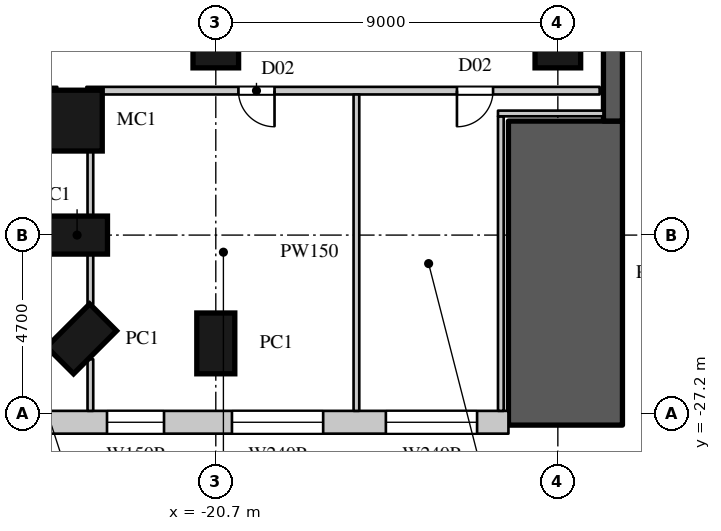
"""IFC4 building model, lengths in metres.
Left out: names, types, materials, properties, quantities, classifications, styles, units other than length and angle.
Written with IfcOpenShell. Run it as: python <this file> out.ifc"""

import sys

from ifc_helpers import new_model, si_unit, direction, frame, frame_2d, origin, origin_2d, place, context, subcontext, project, spatial, rectangle, circle, extrude, element, fill, save


model = new_model("IFC4")
c1 = context("Model", 3, precision=1e-05, world=origin(), true_north=direction((0.0, 1.0)))
c2 = subcontext(c1, "Body", "Model", "MODEL_VIEW")
j1 = project(units=[si_unit("LENGTHUNIT", "METRE"), si_unit("PLANEANGLEUNIT", "RADIAN")], contexts=[c1])
p1 = place(None, origin())
s1 = spatial("IfcSite", under=j1, at=p1, CompositionType="ELEMENT")
p2 = place(p1, origin())
s2 = spatial("IfcBuilding", under=s1, at=p2, CompositionType="ELEMENT")
p3 = place(p2, frame((0.0, 0.0, 19.0)))
s3 = spatial("IfcBuildingStorey", under=s2, at=p3, CompositionType="ELEMENT", Elevation=19.0)
p4 = place(p3, frame((-11.5, -27.5, 0.0), z_axis=(0.0, 0.0, 1.0), x_axis=(0.0, 1.0, 0.0)))
e1 = element("IfcWall", 1, at=p4, inside=s3, PredefinedType="SOLIDWALL", context=c2, shape_type="SweptSolid", body=[
    extrude(rectangle(XDim=8.0, YDim=3.0, at=frame_2d((4.0, 0.0))), origin(), (0.0, 0.0, 1.0), 10.0),
])
p5 = place(p3, frame((-10.25, -19.5, 0.0), z_axis=(0.0, 0.0, 1.0), x_axis=(0.0, 1.0, 0.0)))
e2 = element("IfcWall", 2, at=p5, inside=s3, PredefinedType="SOLIDWALL", context=c2, shape_type="SweptSolid", body=[
    extrude(rectangle(XDim=39.0, YDim=0.5, at=frame_2d((19.5, 0.0))), origin(), (0.0, 0.0, 1.0), 10.0),
])
p6 = place(p3, frame((-24.488, -19.488, 0.0), z_axis=(0.0, 0.0, 1.0), x_axis=(1.0, 0.0, 0.0)))
e3 = element("IfcColumn", 3, at=p6, inside=s3, PredefinedType="COLUMN", context=c2, shape_type="SweptSolid", body=[
    extrude(circle(Radius=0.8, at=origin_2d()), origin(), (0.0, 0.0, 1.0), 10.0),
])
for number, where, z_axis, x_axis in (
    (4, (-24.35, -22.5, 0.0), (0.0, 0.0, 1.0), (0.0, -1.0, 0.0)),
    (5, (-24.231, -25.231, 0.0), (0.0, 0.0, 1.0), (0.707, -0.707, 0.0)),
    (6, (-20.7, -25.35, 0.0), (0.0, 0.0, 1.0), (1.0, 0.0, 0.0)),
):
    element("IfcColumn", number, at=place(p3, frame(where, z_axis=z_axis, x_axis=x_axis)), inside=s3, PredefinedType="COLUMN", context=c2, shape_type="SweptSolid", body=[
        extrude(rectangle(XDim=1.0, YDim=1.6, at=origin_2d()), origin(), (0.0, 0.0, 1.0), 10.0),
    ])
for number, where, z_axis, x_axis in (
    (7, (-20.7, -17.5, 0.0), (0.0, 0.0, 1.0), (1.0, 0.0, 0.0)),
    (8, (-11.7, -17.5, 0.0), (0.0, 0.0, 1.0), (1.0, 0.0, 0.0)),
):
    element("IfcColumn", number, at=place(p3, frame(where, z_axis=z_axis, x_axis=x_axis)), inside=s3, PredefinedType="COLUMN", context=c2, shape_type="SweptSolid", body=[
        extrude(circle(Radius=0.6, at=origin_2d()), origin(), (0.0, 0.0, 1.0), 10.0),
    ])
p7 = place(p3, frame((-29.2, -27.425, 0.0), z_axis=(0.0, 0.0, 1.0), x_axis=(1.0, 0.0, 0.0)))
e9 = element("IfcWall", 9, at=p7, inside=s3, PredefinedType="ELEMENTEDWALL", context=c2, shape_type="SweptSolid", body=[
    extrude(rectangle(XDim=16.2, YDim=0.6, at=frame_2d((8.1, 0.0))), origin(), (0.0, 0.0, 1.0), 9.6),
])
p8 = place(p7, frame((0.825, 0.0, 3.0)))
e10 = element("IfcOpeningElement", 10, at=p8, cuts=e9, PredefinedType="OPENING", context=c2, shape_type="SweptSolid", body=[
    extrude(rectangle(XDim=2.4, YDim=2.4, at=frame_2d((1.2, 1.2))), frame((0.0, 0.31, 0.0), z_axis=(0.0, -1.0, 0.0), x_axis=(1.0, 0.0, 0.0)), (0.0, 0.0, 1.0), 0.62),
])
p9 = place(p7, frame((8.925, 0.0, 3.0)))
e11 = element("IfcOpeningElement", 11, at=p9, cuts=e9, PredefinedType="OPENING", context=c2, shape_type="SweptSolid", body=[
    extrude(rectangle(XDim=2.4, YDim=2.4, at=frame_2d((1.2, 1.2))), frame((0.0, 0.31, 0.0), z_axis=(0.0, -1.0, 0.0), x_axis=(1.0, 0.0, 0.0)), (0.0, 0.0, 1.0), 0.62),
])
p10 = place(p7, frame((12.975, 0.0, 3.0)))
e12 = element("IfcOpeningElement", 12, at=p10, cuts=e9, PredefinedType="OPENING", context=c2, shape_type="SweptSolid", body=[
    extrude(rectangle(XDim=2.4, YDim=2.4, at=frame_2d((1.2, 1.2))), frame((0.0, 0.31, 0.0), z_axis=(0.0, -1.0, 0.0), x_axis=(1.0, 0.0, 0.0)), (0.0, 0.0, 1.0), 0.62),
])
p11 = place(p7, frame((5.637, 0.0, 3.0)))
e13 = element("IfcOpeningElement", 13, at=p11, cuts=e9, PredefinedType="OPENING", context=c2, shape_type="SweptSolid", body=[
    extrude(rectangle(XDim=1.5, YDim=2.4, at=frame_2d((0.75, 1.2))), frame((0.0, 0.31, 0.0), z_axis=(0.0, -1.0, 0.0), x_axis=(1.0, 0.0, 0.0)), (0.0, 0.0, 1.0), 0.62),
])
p12 = place(p3, frame((-28.55, -18.7, 0.0), z_axis=(0.0, 0.0, 1.0), x_axis=(1.0, 0.0, 0.0)))
e14 = element("IfcWall", 14, at=p12, inside=s3, PredefinedType="PARTITIONING", context=c2, shape_type="SweptSolid", body=[
    extrude(rectangle(XDim=3.679, YDim=0.2, at=frame_2d((1.839, 0.0))), origin(), (0.0, 0.0, 1.0), 9.598),
])
p13 = place(p12, frame((1.35, 0.0, 0.0)))
e15 = element("IfcOpeningElement", 15, at=p13, cuts=e14, PredefinedType="OPENING", context=c2, shape_type="SweptSolid", body=[
    extrude(rectangle(XDim=0.95, YDim=2.2, at=frame_2d((0.475, 1.1))), frame((0.0, 0.11, 0.0), z_axis=(0.0, -1.0, 0.0), x_axis=(1.0, 0.0, 0.0)), (0.0, 0.0, 1.0), 0.22),
])
p14 = place(p3, frame((-24.105, -18.7, 0.0), z_axis=(0.0, 0.0, 1.0), x_axis=(1.0, 0.0, 0.0)))
e16 = element("IfcWall", 16, at=p14, inside=s3, PredefinedType="PARTITIONING", context=c2, shape_type="SweptSolid", body=[
    extrude(rectangle(XDim=13.505, YDim=0.2, at=frame_2d((6.752, 0.0))), origin(), (0.0, 0.0, 1.0), 9.598),
])
p15 = place(p14, frame((4.0, 0.0, 0.0)))
e17 = element("IfcOpeningElement", 17, at=p15, cuts=e16, PredefinedType="OPENING", context=c2, shape_type="SweptSolid", body=[
    extrude(rectangle(XDim=0.95, YDim=2.2, at=frame_2d((0.475, 1.1))), frame((0.0, 0.11, 0.0), z_axis=(0.0, -1.0, 0.0), x_axis=(1.0, 0.0, 0.0)), (0.0, 0.0, 1.0), 0.22),
])
p16 = place(p14, frame((9.75, 0.0, 0.0)))
e18 = element("IfcOpeningElement", 18, at=p16, cuts=e16, PredefinedType="OPENING", context=c2, shape_type="SweptSolid", body=[
    extrude(rectangle(XDim=0.95, YDim=2.2, at=frame_2d((0.475, 1.1))), frame((0.0, 0.11, 0.0), z_axis=(0.0, -1.0, 0.0), x_axis=(1.0, 0.0, 0.0)), (0.0, 0.0, 1.0), 0.22),
])
p17 = place(p3, frame((-24.0, -27.125, 0.0), z_axis=(0.0, 0.0, 1.0), x_axis=(0.0, 1.0, 0.0)))
e19 = element("IfcWall", 19, at=p17, inside=s3, PredefinedType="PARTITIONING", context=c2, shape_type="SweptSolid", body=[
    extrude(rectangle(XDim=1.358, YDim=0.15, at=frame_2d((0.679, 0.0))), origin(), (0.0, 0.0, 1.0), 9.598),
])
p18 = place(p3, frame((-24.0, -24.32, 0.0), z_axis=(0.0, 0.0, 1.0), x_axis=(0.0, 1.0, 0.0)))
e20 = element("IfcWall", 20, at=p18, inside=s3, PredefinedType="PARTITIONING", context=c2, shape_type="SweptSolid", body=[
    extrude(rectangle(XDim=1.32, YDim=0.15, at=frame_2d((0.66, 0.0))), origin(), (0.0, 0.0, 1.0), 9.598),
])
p19 = place(p3, frame((-24.0, -22.0, 0.0), z_axis=(0.0, 0.0, 1.0), x_axis=(0.0, 1.0, 0.0)))
e21 = element("IfcWall", 21, at=p19, inside=s3, PredefinedType="PARTITIONING", context=c2, shape_type="SweptSolid", body=[
    extrude(rectangle(XDim=1.843, YDim=0.15, at=frame_2d((0.921, 0.0))), origin(), (0.0, 0.0, 1.0), 9.598),
])
p20 = place(p3, frame((-17.0, -27.125, 0.0), z_axis=(0.0, 0.0, 1.0), x_axis=(0.0, 1.0, 0.0)))
e22 = element("IfcWall", 22, at=p20, inside=s3, PredefinedType="PARTITIONING", context=c2, shape_type="SweptSolid", body=[
    extrude(rectangle(XDim=8.325, YDim=0.15, at=frame_2d((4.163, 0.0))), origin(), (0.0, 0.0, 1.0), 9.598),
])
p21 = place(p3, frame((-13.2, -27.125, 0.0), z_axis=(0.0, 0.0, 1.0), x_axis=(0.0, 1.0, 0.0)))
e23 = element("IfcWall", 23, at=p21, inside=s3, PredefinedType="PARTITIONING", context=c2, shape_type="SweptSolid", body=[
    extrude(rectangle(XDim=7.75, YDim=0.15, at=frame_2d((3.875, 0.0))), origin(), (0.0, 0.0, 1.0), 9.598),
])
p22 = place(p3, frame((-13.275, -19.3, 0.0), z_axis=(0.0, 0.0, 1.0), x_axis=(1.0, 0.0, 0.0)))
e24 = element("IfcWall", 24, at=p22, inside=s3, PredefinedType="PARTITIONING", context=c2, shape_type="SweptSolid", body=[
    extrude(rectangle(XDim=2.775, YDim=0.15, at=frame_2d((1.387, 0.0))), origin(), (0.0, 0.0, 1.0), 9.598),
])
p23 = place(p9, origin())
e25 = element("IfcWindow", 25, at=p23, inside=s3, PartitioningType="SINGLE_PANEL", PredefinedType="WINDOW", context=c2, shape_type="SweptSolid", body=[
    extrude(rectangle(XDim=2.4, YDim=2.4, at=frame_2d((1.2, 1.2))), frame((0.0, 0.06, 0.0), z_axis=(0.0, -1.0, 0.0), x_axis=(1.0, 0.0, 0.0)), (0.0, 0.0, 1.0), 0.06),
])
fill(e11, e25)
p24 = place(p10, origin())
e26 = element("IfcWindow", 26, at=p24, inside=s3, PartitioningType="SINGLE_PANEL", PredefinedType="WINDOW", context=c2, shape_type="SweptSolid", body=[
    extrude(rectangle(XDim=2.4, YDim=2.4, at=frame_2d((1.2, 1.2))), frame((0.0, 0.06, 0.0), z_axis=(0.0, -1.0, 0.0), x_axis=(1.0, 0.0, 0.0)), (0.0, 0.0, 1.0), 0.06),
])
fill(e12, e26)
p25 = place(p15, origin())
e27 = element("IfcDoor", 27, at=p25, inside=s3, OperationType="SINGLE_SWING_LEFT", PredefinedType="DOOR", context=c2, shape_type="SweptSolid", body=[
    extrude(rectangle(XDim=0.95, YDim=2.2, at=frame_2d((0.475, 1.1))), frame((0.0, 0.025, 0.0), z_axis=(0.0, -1.0, 0.0), x_axis=(1.0, 0.0, 0.0)), (0.0, 0.0, 1.0), 0.05),
])
fill(e17, e27)
p26 = place(p16, origin())
e28 = element("IfcDoor", 28, at=p26, inside=s3, OperationType="SINGLE_SWING_RIGHT", PredefinedType="DOOR", context=c2, shape_type="SweptSolid", body=[
    extrude(rectangle(XDim=0.95, YDim=2.2, at=frame_2d((0.475, 1.1))), frame((0.0, 0.025, 0.0), z_axis=(0.0, -1.0, 0.0), x_axis=(1.0, 0.0, 0.0)), (0.0, 0.0, 1.0), 0.05),
])
fill(e18, e28)
p27 = place(p11, origin())
e29 = element("IfcWindow", 29, at=p27, inside=s3, PartitioningType="SINGLE_PANEL", PredefinedType="WINDOW", context=c2, shape_type="SweptSolid", body=[
    extrude(rectangle(XDim=1.5, YDim=2.4, at=frame_2d((0.75, 1.2))), frame((0.0, 0.06, 0.0), z_axis=(0.0, -1.0, 0.0), x_axis=(1.0, 0.0, 0.0)), (0.0, 0.0, 1.0), 0.06),
])
fill(e13, e29)
save(model, sys.argv[1])
